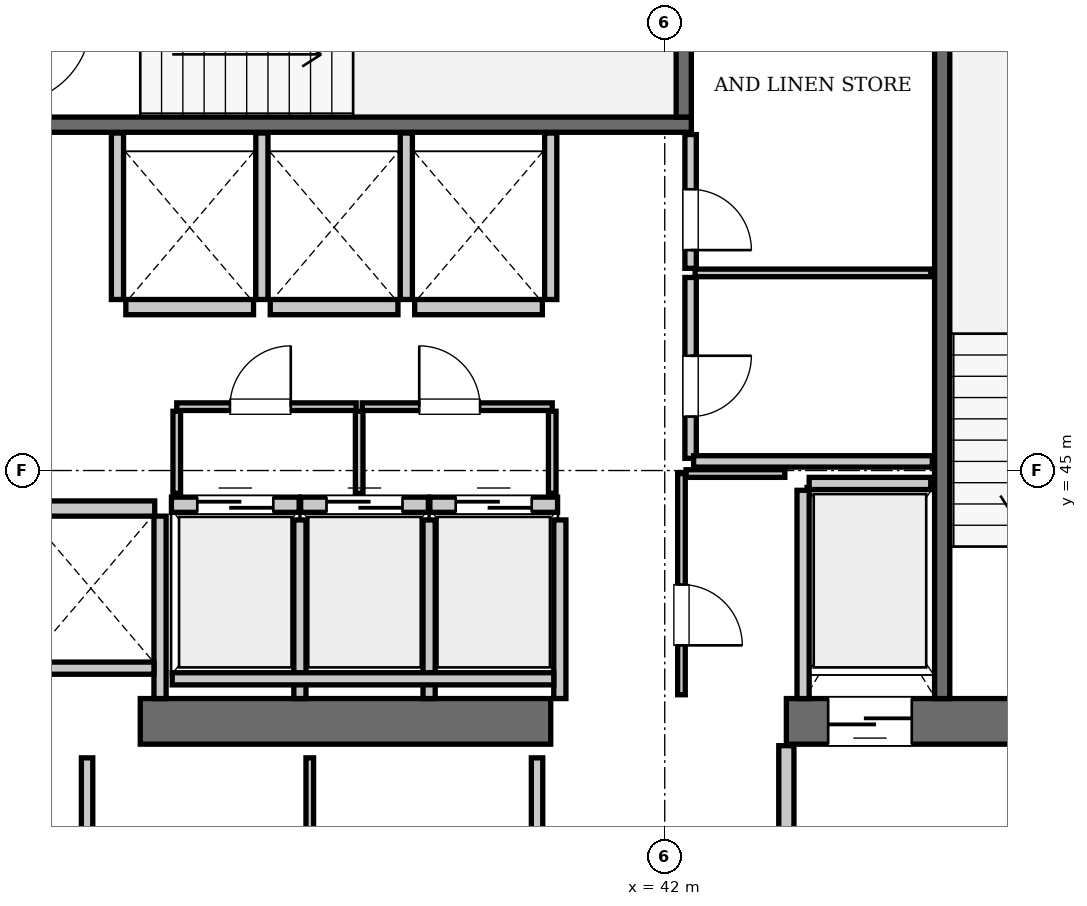
"""IFC4 building model, lengths in metres.
Left out: names, types, materials, properties, quantities, classifications, styles, units other than length and angle.
Written with IfcOpenShell. Run it as: python <this file> out.ifc"""

import sys

from ifc_helpers import new_model, si_unit, direction, frame, frame_2d, origin, place, context, subcontext, project, spatial, rectangle, extrude, element, fill, save


model = new_model("IFC4")
c1 = context("Model", 3, precision=1e-05, world=origin(), true_north=direction((0.0, 1.0)))
c2 = subcontext(c1, "Body", "Model", "MODEL_VIEW")
j1 = project(units=[si_unit("LENGTHUNIT", "METRE"), si_unit("PLANEANGLEUNIT", "RADIAN")], contexts=[c1])
p1 = place(None, origin())
s1 = spatial("IfcSite", under=j1, at=p1, CompositionType="ELEMENT")
p2 = place(p1, origin())
s2 = spatial("IfcBuilding", under=s1, at=p2, CompositionType="ELEMENT")
p3 = place(p2, frame((0.0, 0.0, 337.4)))
s3 = spatial("IfcBuildingStorey", under=s2, at=p3, CompositionType="ELEMENT", Elevation=337.4)
p4 = place(p3, frame((35.1, 41.7, 0.0), z_axis=(0.0, 0.0, 1.0), x_axis=(1.0, 0.0, 0.0)))
e1 = element("IfcWall", 1, at=p4, inside=s3, PredefinedType="SHEAR", context=c2, shape_type="SweptSolid", body=[
    extrude(rectangle(XDim=5.4, YDim=0.6, at=frame_2d((2.7, 0.0))), origin(), (0.0, 0.0, 1.0), 3.85),
])
p5 = place(p3, frame((43.6, 41.7, 0.0), z_axis=(0.0, 0.0, 1.0), x_axis=(1.0, 0.0, 0.0)))
e2 = element("IfcWall", 2, at=p5, inside=s3, PredefinedType="SHEAR", context=c2, shape_type="SweptSolid", body=[
    extrude(rectangle(XDim=6.8, YDim=0.6, at=frame_2d((3.4, 0.0))), origin(), (0.0, 0.0, 1.0), 3.85),
])
p6 = place(p5, frame((3.9, 0.0, 0.0)))
e3 = element("IfcOpeningElement", 3, at=p6, cuts=e2, PredefinedType="OPENING", context=c2, shape_type="SweptSolid", body=[
    extrude(rectangle(XDim=1.15, YDim=2.15, at=frame_2d((0.575, 1.075))), frame((0.0, 0.31, 0.0), z_axis=(0.0, -1.0, 0.0), x_axis=(1.0, 0.0, 0.0)), (0.0, 0.0, 1.0), 0.62),
])
p7 = place(p5, frame((0.55, 0.0, 0.0)))
e4 = element("IfcOpeningElement", 4, at=p7, cuts=e2, PredefinedType="OPENING", context=c2, shape_type="SweptSolid", body=[
    extrude(rectangle(XDim=1.1, YDim=2.2, at=frame_2d((0.55, 1.1))), frame((0.0, 0.31, 0.0), z_axis=(0.0, -1.0, 0.0), x_axis=(1.0, 0.0, 0.0)), (0.0, 0.0, 1.0), 0.62),
])
p8 = place(p3, frame((33.25, 49.55, 0.0), z_axis=(0.0, 0.0, 1.0), x_axis=(1.0, 0.0, 0.0)))
e5 = element("IfcWall", 5, at=p8, inside=s3, PredefinedType="SOLIDWALL", context=c2, shape_type="SweptSolid", body=[
    extrude(rectangle(XDim=9.1, YDim=0.2, at=frame_2d((4.55, 0.0))), origin(), (0.0, 0.0, 1.0), 3.61),
])
p9 = place(p3, frame((42.25, 49.65, 0.0), z_axis=(0.0, 0.0, 1.0), x_axis=(0.0, 1.0, 0.0)))
e6 = element("IfcWall", 6, at=p9, inside=s3, PredefinedType="SOLIDWALL", context=c2, shape_type="SweptSolid", body=[
    extrude(rectangle(XDim=3.75, YDim=0.2, at=frame_2d((1.875, 0.0))), origin(), (0.0, 0.0, 1.0), 3.61),
])
p10 = place(p3, frame((45.65, 42.0, 0.0), z_axis=(0.0, 0.0, 1.0), x_axis=(0.0, 1.0, 0.0)))
e7 = element("IfcWall", 7, at=p10, inside=s3, PredefinedType="SOLIDWALL", context=c2, shape_type="SweptSolid", body=[
    extrude(rectangle(XDim=9.15, YDim=0.2, at=frame_2d((4.575, 0.0))), origin(), (0.0, 0.0, 1.0), 3.61),
])
p11 = place(p3, frame((35.51, 44.55, 0.0), z_axis=(0.0, 0.0, 1.0), x_axis=(1.0, 0.0, 0.0)))
e8 = element("IfcWall", 8, at=p11, inside=s3, PredefinedType="SOLIDWALL", context=c2, shape_type="SweptSolid", body=[
    extrude(rectangle(XDim=1.68, YDim=0.2, at=frame_2d((0.84, 0.0))), origin(), (0.0, 0.0, 1.0), 3.61),
])
p12 = place(p11, frame((0.34, 0.0, 0.0)))
e9 = element("IfcOpeningElement", 9, at=p12, cuts=e8, PredefinedType="OPENING", context=c2, shape_type="SweptSolid", body=[
    extrude(rectangle(XDim=1.0, YDim=2.15, at=frame_2d((0.5, 1.075))), frame((0.0, 0.11, 0.0), z_axis=(0.0, -1.0, 0.0), x_axis=(1.0, 0.0, 0.0)), (0.0, 0.0, 1.0), 0.22),
])
p13 = place(p3, frame((37.21, 44.55, 0.0), z_axis=(0.0, 0.0, 1.0), x_axis=(1.0, 0.0, 0.0)))
e10 = element("IfcWall", 10, at=p13, inside=s3, PredefinedType="SOLIDWALL", context=c2, shape_type="SweptSolid", body=[
    extrude(rectangle(XDim=1.68, YDim=0.2, at=frame_2d((0.84, 0.0))), origin(), (0.0, 0.0, 1.0), 3.61),
])
p14 = place(p13, frame((0.34, 0.0, 0.0)))
e11 = element("IfcOpeningElement", 11, at=p14, cuts=e10, PredefinedType="OPENING", context=c2, shape_type="SweptSolid", body=[
    extrude(rectangle(XDim=1.0, YDim=2.15, at=frame_2d((0.5, 1.075))), frame((0.0, 0.11, 0.0), z_axis=(0.0, -1.0, 0.0), x_axis=(1.0, 0.0, 0.0)), (0.0, 0.0, 1.0), 0.22),
])
p15 = place(p3, frame((38.91, 44.55, 0.0), z_axis=(0.0, 0.0, 1.0), x_axis=(1.0, 0.0, 0.0)))
e12 = element("IfcWall", 12, at=p15, inside=s3, PredefinedType="SOLIDWALL", context=c2, shape_type="SweptSolid", body=[
    extrude(rectangle(XDim=1.68, YDim=0.2, at=frame_2d((0.84, 0.0))), origin(), (0.0, 0.0, 1.0), 3.61),
])
p16 = place(p15, frame((0.34, 0.0, 0.0)))
e13 = element("IfcOpeningElement", 13, at=p16, cuts=e12, PredefinedType="OPENING", context=c2, shape_type="SweptSolid", body=[
    extrude(rectangle(XDim=1.0, YDim=2.15, at=frame_2d((0.5, 1.075))), frame((0.0, 0.11, 0.0), z_axis=(0.0, -1.0, 0.0), x_axis=(1.0, 0.0, 0.0)), (0.0, 0.0, 1.0), 0.22),
])
p17 = place(p3, frame((34.91, 47.15, 0.0), z_axis=(0.0, 0.0, 1.0), x_axis=(1.0, 0.0, 0.0)))
e14 = element("IfcWall", 14, at=p17, inside=s3, PredefinedType="SOLIDWALL", context=c2, shape_type="SweptSolid", body=[
    extrude(rectangle(XDim=1.68, YDim=0.2, at=frame_2d((0.84, 0.0))), origin(), (0.0, 0.0, 1.0), 3.61),
])
for number, where, z_axis, x_axis in (
    (15, (36.81, 47.15, 0.0), (0.0, 0.0, 1.0), (1.0, 0.0, 0.0)),
    (16, (38.71, 47.15, 0.0), (0.0, 0.0, 1.0), (1.0, 0.0, 0.0)),
    (17, (33.61, 44.5, 0.0), (0.0, 0.0, 1.0), (1.0, 0.0, 0.0)),
):
    element("IfcWall", number, at=place(p3, frame(where, z_axis=z_axis, x_axis=x_axis)), inside=s3, PredefinedType="SOLIDWALL", context=c2, shape_type="SweptSolid", body=[
        extrude(rectangle(XDim=1.68, YDim=0.2, at=frame_2d((0.84, 0.0))), origin(), (0.0, 0.0, 1.0), 3.61),
    ])
p18 = place(p3, frame((43.9, 44.83, 0.0), z_axis=(0.0, 0.0, 1.0), x_axis=(1.0, 0.0, 0.0)))
e18 = element("IfcWall", 18, at=p18, inside=s3, PredefinedType="SOLIDWALL", context=c2, shape_type="SweptSolid", body=[
    extrude(rectangle(XDim=1.6, YDim=0.16, at=frame_2d((0.8, 0.0))), origin(), (0.0, 0.0, 1.0), 3.61),
])
p19 = place(p3, frame((43.82, 42.0, 0.0), z_axis=(0.0, 0.0, 1.0), x_axis=(0.0, 1.0, 0.0)))
e19 = element("IfcWall", 19, at=p19, inside=s3, PredefinedType="SOLIDWALL", context=c2, shape_type="SweptSolid", body=[
    extrude(rectangle(XDim=2.74, YDim=0.16, at=frame_2d((1.37, 0.0))), origin(), (0.0, 0.0, 1.0), 3.61),
])
for number, where, z_axis, x_axis in (
    (20, (37.2, 42.0, 0.0), (0.0, 0.0, 1.0), (0.0, 1.0, 0.0)),
    (21, (38.9, 42.0, 0.0), (0.0, 0.0, 1.0), (0.0, 1.0, 0.0)),
    (22, (40.62, 42.0, 0.0), (0.0, 0.0, 1.0), (0.0, 1.0, 0.0)),
):
    element("IfcWall", number, at=place(p3, frame(where, z_axis=z_axis, x_axis=x_axis)), inside=s3, PredefinedType="SOLIDWALL", context=c2, shape_type="SweptSolid", body=[
        extrude(rectangle(XDim=2.35, YDim=0.16, at=frame_2d((1.175, 0.0))), origin(), (0.0, 0.0, 1.0), 3.61),
    ])
p20 = place(p3, frame((35.52, 42.26, 0.0), z_axis=(0.0, 0.0, 1.0), x_axis=(1.0, 0.0, 0.0)))
e23 = element("IfcWall", 23, at=p20, inside=s3, PredefinedType="SOLIDWALL", context=c2, shape_type="SweptSolid", body=[
    extrude(rectangle(XDim=5.02, YDim=0.16, at=frame_2d((2.51, 0.0))), origin(), (0.0, 0.0, 1.0), 3.61),
])
for number, where, z_axis, x_axis in (
    (24, (34.8, 47.25, 0.0), (0.0, 0.0, 1.0), (0.0, 1.0, 0.0)),
    (25, (36.7, 47.25, 0.0), (0.0, 0.0, 1.0), (0.0, 1.0, 0.0)),
    (26, (38.6, 47.25, 0.0), (0.0, 0.0, 1.0), (0.0, 1.0, 0.0)),
    (27, (40.5, 47.25, 0.0), (0.0, 0.0, 1.0), (0.0, 1.0, 0.0)),
):
    element("IfcWall", number, at=place(p3, frame(where, z_axis=z_axis, x_axis=x_axis)), inside=s3, PredefinedType="SOLIDWALL", context=c2, shape_type="SweptSolid", body=[
        extrude(rectangle(XDim=2.19, YDim=0.16, at=frame_2d((1.095, 0.0))), origin(), (0.0, 0.0, 1.0), 3.61),
    ])
p21 = place(p3, frame((35.36, 42.0, 0.0), z_axis=(0.0, 0.0, 1.0), x_axis=(0.0, 1.0, 0.0)))
e28 = element("IfcWall", 28, at=p21, inside=s3, PredefinedType="SOLIDWALL", context=c2, shape_type="SweptSolid", body=[
    extrude(rectangle(XDim=2.4, YDim=0.16, at=frame_2d((1.2, 0.0))), origin(), (0.0, 0.0, 1.0), 3.61),
])
p22 = place(p3, frame((33.62, 42.4, 0.0), z_axis=(0.0, 0.0, 1.0), x_axis=(1.0, 0.0, 0.0)))
e29 = element("IfcWall", 29, at=p22, inside=s3, PredefinedType="SOLIDWALL", context=c2, shape_type="SweptSolid", body=[
    extrude(rectangle(XDim=1.66, YDim=0.16, at=frame_2d((0.83, 0.0))), origin(), (0.0, 0.0, 1.0), 3.61),
])
p23 = place(p3, frame((43.6, 38.31, 0.0), z_axis=(0.0, 0.0, 1.0), x_axis=(0.0, 1.0, 0.0)))
e30 = element("IfcWall", 30, at=p23, inside=s3, PredefinedType="PARTITIONING", context=c2, shape_type="SweptSolid", body=[
    extrude(rectangle(XDim=3.07, YDim=0.2, at=frame_2d((1.535, 0.0))), origin(), (0.0, 0.0, 1.0), 3.61),
])
p24 = place(p3, frame((35.58, 45.84, 0.0), z_axis=(0.0, 0.0, 1.0), x_axis=(1.0, 0.0, 0.0)))
e31 = element("IfcWall", 31, at=p24, inside=s3, PredefinedType="PARTITIONING", context=c2, shape_type="SweptSolid", body=[
    extrude(rectangle(XDim=2.36, YDim=0.1, at=frame_2d((1.18, 0.0))), origin(), (0.0, 0.0, 1.0), 3.61),
])
p25 = place(p24, frame((0.7, 0.0, 0.0)))
e32 = element("IfcOpeningElement", 32, at=p25, cuts=e31, PredefinedType="OPENING", context=c2, shape_type="SweptSolid", body=[
    extrude(rectangle(XDim=0.8, YDim=2.05, at=frame_2d((0.4, 1.025))), frame((0.0, 0.06, 0.0), z_axis=(0.0, -1.0, 0.0), x_axis=(1.0, 0.0, 0.0)), (0.0, 0.0, 1.0), 0.12),
])
p26 = place(p3, frame((38.02, 45.84, 0.0), z_axis=(0.0, 0.0, 1.0), x_axis=(1.0, 0.0, 0.0)))
e33 = element("IfcWall", 33, at=p26, inside=s3, PredefinedType="PARTITIONING", context=c2, shape_type="SweptSolid", body=[
    extrude(rectangle(XDim=2.5, YDim=0.1, at=frame_2d((1.25, 0.0))), origin(), (0.0, 0.0, 1.0), 3.61),
])
p27 = place(p26, frame((0.75, 0.0, 0.0)))
e34 = element("IfcOpeningElement", 34, at=p27, cuts=e33, PredefinedType="OPENING", context=c2, shape_type="SweptSolid", body=[
    extrude(rectangle(XDim=0.8, YDim=2.05, at=frame_2d((0.4, 1.025))), frame((0.0, 0.06, 0.0), z_axis=(0.0, -1.0, 0.0), x_axis=(1.0, 0.0, 0.0)), (0.0, 0.0, 1.0), 0.12),
])
for number, where, z_axis, x_axis in (
    (35, (35.58, 44.7, 0.0), (0.0, 0.0, 1.0), (0.0, 1.0, 0.0)),
    (36, (37.98, 44.7, 0.0), (0.0, 0.0, 1.0), (0.0, 1.0, 0.0)),
    (37, (40.52, 44.7, 0.0), (0.0, 0.0, 1.0), (0.0, 1.0, 0.0)),
):
    element("IfcWall", number, at=place(p3, frame(where, z_axis=z_axis, x_axis=x_axis)), inside=s3, PredefinedType="PARTITIONING", context=c2, shape_type="SweptSolid", body=[
        extrude(rectangle(XDim=1.08, YDim=0.1, at=frame_2d((0.54, 0.0))), origin(), (0.0, 0.0, 1.0), 3.61),
    ])
p28 = place(p3, frame((42.22, 42.05, 0.0), z_axis=(0.0, 0.0, 1.0), x_axis=(0.0, 1.0, 0.0)))
e38 = element("IfcWall", 38, at=p28, inside=s3, PredefinedType="PARTITIONING", context=c2, shape_type="SweptSolid", body=[
    extrude(rectangle(XDim=2.91, YDim=0.1, at=frame_2d((1.455, 0.0))), origin(), (0.0, 0.0, 1.0), 3.61),
])
p29 = place(p28, frame((0.65, 0.0, 0.0)))
e39 = element("IfcOpeningElement", 39, at=p29, cuts=e38, PredefinedType="OPENING", context=c2, shape_type="SweptSolid", body=[
    extrude(rectangle(XDim=0.8, YDim=2.05, at=frame_2d((0.4, 1.025))), frame((0.0, 0.06, 0.0), z_axis=(0.0, -1.0, 0.0), x_axis=(1.0, 0.0, 0.0)), (0.0, 0.0, 1.0), 0.12),
])
p30 = place(p3, frame((42.28, 44.96, 0.0), z_axis=(0.0, 0.0, 1.0), x_axis=(1.0, 0.0, 0.0)))
e40 = element("IfcWall", 40, at=p30, inside=s3, PredefinedType="PARTITIONING", context=c2, shape_type="SweptSolid", body=[
    extrude(rectangle(XDim=1.3, YDim=0.1, at=frame_2d((0.65, 0.0))), origin(), (0.0, 0.0, 1.0), 3.61),
])
p31 = place(p3, frame((42.34, 45.16, 0.0), z_axis=(0.0, 0.0, 1.0), x_axis=(0.0, 1.0, 0.0)))
e41 = element("IfcWall", 41, at=p31, inside=s3, PredefinedType="PARTITIONING", context=c2, shape_type="SweptSolid", body=[
    extrude(rectangle(XDim=2.38, YDim=0.15, at=frame_2d((1.19, 0.0))), origin(), (0.0, 0.0, 1.0), 3.61),
])
p32 = place(p31, frame((0.55, 0.0, 0.0)))
e42 = element("IfcOpeningElement", 42, at=p32, cuts=e41, PredefinedType="OPENING", context=c2, shape_type="SweptSolid", body=[
    extrude(rectangle(XDim=0.8, YDim=2.05, at=frame_2d((0.4, 1.025))), frame((0.0, 0.085, 0.0), z_axis=(0.0, -1.0, 0.0), x_axis=(1.0, 0.0, 0.0)), (0.0, 0.0, 1.0), 0.17),
])
p33 = place(p3, frame((42.34, 47.66, 0.0), z_axis=(0.0, 0.0, 1.0), x_axis=(0.0, 1.0, 0.0)))
e43 = element("IfcWall", 43, at=p33, inside=s3, PredefinedType="PARTITIONING", context=c2, shape_type="SweptSolid", body=[
    extrude(rectangle(XDim=1.76, YDim=0.15, at=frame_2d((0.88, 0.0))), origin(), (0.0, 0.0, 1.0), 3.61),
])
p34 = place(p33, frame((0.24, 0.0, 0.0)))
e44 = element("IfcOpeningElement", 44, at=p34, cuts=e43, PredefinedType="OPENING", context=c2, shape_type="SweptSolid", body=[
    extrude(rectangle(XDim=0.8, YDim=2.05, at=frame_2d((0.4, 1.025))), frame((0.0, 0.085, 0.0), z_axis=(0.0, -1.0, 0.0), x_axis=(1.0, 0.0, 0.0)), (0.0, 0.0, 1.0), 0.17),
])
p35 = place(p3, frame((42.4, 47.6, 0.0), z_axis=(0.0, 0.0, 1.0), x_axis=(1.0, 0.0, 0.0)))
e45 = element("IfcWall", 45, at=p35, inside=s3, PredefinedType="PARTITIONING", context=c2, shape_type="SweptSolid", body=[
    extrude(rectangle(XDim=3.1, YDim=0.1, at=frame_2d((1.55, 0.0))), origin(), (0.0, 0.0, 1.0), 3.61),
])
p36 = place(p3, frame((42.38, 45.12, 0.0), z_axis=(0.0, 0.0, 1.0), x_axis=(1.0, 0.0, 0.0)))
e46 = element("IfcWall", 46, at=p36, inside=s3, PredefinedType="PARTITIONING", context=c2, shape_type="SweptSolid", body=[
    extrude(rectangle(XDim=3.14, YDim=0.15, at=frame_2d((1.57, 0.0))), origin(), (0.0, 0.0, 1.0), 3.61),
])
p37 = place(p3, frame((34.4, 38.38, 0.0), z_axis=(0.0, 0.0, 1.0), x_axis=(0.0, 1.0, 0.0)))
e47 = element("IfcWall", 47, at=p37, inside=s3, PredefinedType="PARTITIONING", context=c2, shape_type="SweptSolid", body=[
    extrude(rectangle(XDim=2.84, YDim=0.15, at=frame_2d((1.42, 0.0))), origin(), (0.0, 0.0, 1.0), 3.61),
])
p38 = place(p3, frame((37.33, 38.38, 0.0), z_axis=(0.0, 0.0, 1.0), x_axis=(0.0, 1.0, 0.0)))
e48 = element("IfcWall", 48, at=p38, inside=s3, PredefinedType="PARTITIONING", context=c2, shape_type="SweptSolid", body=[
    extrude(rectangle(XDim=2.84, YDim=0.1, at=frame_2d((1.42, 0.0))), origin(), (0.0, 0.0, 1.0), 3.61),
])
p39 = place(p3, frame((40.32, 38.38, 0.0), z_axis=(0.0, 0.0, 1.0), x_axis=(0.0, 1.0, 0.0)))
e49 = element("IfcWall", 49, at=p39, inside=s3, PredefinedType="PARTITIONING", context=c2, shape_type="SweptSolid", body=[
    extrude(rectangle(XDim=2.84, YDim=0.15, at=frame_2d((1.42, 0.0))), origin(), (0.0, 0.0, 1.0), 3.61),
])
p40 = place(p12, origin())
e50 = element("IfcDoor", 50, at=p40, inside=s3, OperationType="SLIDING_TO_LEFT", PredefinedType="DOOR", context=c2, shape_type="SweptSolid", body=[
    extrude(rectangle(XDim=1.0, YDim=2.15, at=frame_2d((0.5, 1.075))), frame((0.0, 0.025, 0.0), z_axis=(0.0, -1.0, 0.0), x_axis=(1.0, 0.0, 0.0)), (0.0, 0.0, 1.0), 0.05),
])
fill(e9, e50)
p41 = place(p14, origin())
e51 = element("IfcDoor", 51, at=p41, inside=s3, OperationType="SLIDING_TO_LEFT", PredefinedType="DOOR", context=c2, shape_type="SweptSolid", body=[
    extrude(rectangle(XDim=1.0, YDim=2.15, at=frame_2d((0.5, 1.075))), frame((0.0, 0.025, 0.0), z_axis=(0.0, -1.0, 0.0), x_axis=(1.0, 0.0, 0.0)), (0.0, 0.0, 1.0), 0.05),
])
fill(e11, e51)
p42 = place(p16, origin())
e52 = element("IfcDoor", 52, at=p42, inside=s3, OperationType="SLIDING_TO_LEFT", PredefinedType="DOOR", context=c2, shape_type="SweptSolid", body=[
    extrude(rectangle(XDim=1.0, YDim=2.15, at=frame_2d((0.5, 1.075))), frame((0.0, 0.025, 0.0), z_axis=(0.0, -1.0, 0.0), x_axis=(1.0, 0.0, 0.0)), (0.0, 0.0, 1.0), 0.05),
])
fill(e13, e52)
p43 = place(p7, frame((1.1, 0.0, 0.0), z_axis=(0.0, 0.0, 1.0), x_axis=(-1.0, 0.0, 0.0)))
e53 = element("IfcDoor", 53, at=p43, inside=s3, OperationType="SLIDING_TO_LEFT", PredefinedType="DOOR", context=c2, shape_type="SweptSolid", body=[
    extrude(rectangle(XDim=1.1, YDim=2.2, at=frame_2d((0.55, 1.1))), frame((0.0, 0.025, 0.0), z_axis=(0.0, -1.0, 0.0), x_axis=(1.0, 0.0, 0.0)), (0.0, 0.0, 1.0), 0.05),
])
fill(e4, e53)
p44 = place(p25, origin())
e54 = element("IfcDoor", 54, at=p44, inside=s3, OperationType="SINGLE_SWING_RIGHT", PredefinedType="DOOR", context=c2, shape_type="SweptSolid", body=[
    extrude(rectangle(XDim=0.8, YDim=2.05, at=frame_2d((0.4, 1.025))), frame((0.0, 0.025, 0.0), z_axis=(0.0, -1.0, 0.0), x_axis=(1.0, 0.0, 0.0)), (0.0, 0.0, 1.0), 0.05),
])
fill(e32, e54)
p45 = place(p27, origin())
e55 = element("IfcDoor", 55, at=p45, inside=s3, OperationType="SINGLE_SWING_LEFT", PredefinedType="DOOR", context=c2, shape_type="SweptSolid", body=[
    extrude(rectangle(XDim=0.8, YDim=2.05, at=frame_2d((0.4, 1.025))), frame((0.0, 0.025, 0.0), z_axis=(0.0, -1.0, 0.0), x_axis=(1.0, 0.0, 0.0)), (0.0, 0.0, 1.0), 0.05),
])
fill(e34, e55)
p46 = place(p29, frame((0.8, 0.0, 0.0), z_axis=(0.0, 0.0, 1.0), x_axis=(-1.0, 0.0, 0.0)))
e56 = element("IfcDoor", 56, at=p46, inside=s3, OperationType="SINGLE_SWING_RIGHT", PredefinedType="DOOR", context=c2, shape_type="SweptSolid", body=[
    extrude(rectangle(XDim=0.8, YDim=2.05, at=frame_2d((0.4, 1.025))), frame((0.0, 0.025, 0.0), z_axis=(0.0, -1.0, 0.0), x_axis=(1.0, 0.0, 0.0)), (0.0, 0.0, 1.0), 0.05),
])
fill(e39, e56)
p47 = place(p32, frame((0.8, 0.0, 0.0), z_axis=(0.0, 0.0, 1.0), x_axis=(-1.0, 0.0, 0.0)))
e57 = element("IfcDoor", 57, at=p47, inside=s3, OperationType="SINGLE_SWING_LEFT", PredefinedType="DOOR", context=c2, shape_type="SweptSolid", body=[
    extrude(rectangle(XDim=0.8, YDim=2.05, at=frame_2d((0.4, 1.025))), frame((0.0, 0.025, 0.0), z_axis=(0.0, -1.0, 0.0), x_axis=(1.0, 0.0, 0.0)), (0.0, 0.0, 1.0), 0.05),
])
fill(e42, e57)
p48 = place(p34, frame((0.8, 0.0, 0.0), z_axis=(0.0, 0.0, 1.0), x_axis=(-1.0, 0.0, 0.0)))
e58 = element("IfcDoor", 58, at=p48, inside=s3, OperationType="SINGLE_SWING_RIGHT", PredefinedType="DOOR", context=c2, shape_type="SweptSolid", body=[
    extrude(rectangle(XDim=0.8, YDim=2.05, at=frame_2d((0.4, 1.025))), frame((0.0, 0.025, 0.0), z_axis=(0.0, -1.0, 0.0), x_axis=(1.0, 0.0, 0.0)), (0.0, 0.0, 1.0), 0.05),
])
fill(e44, e58)
save(model, sys.argv[1])
